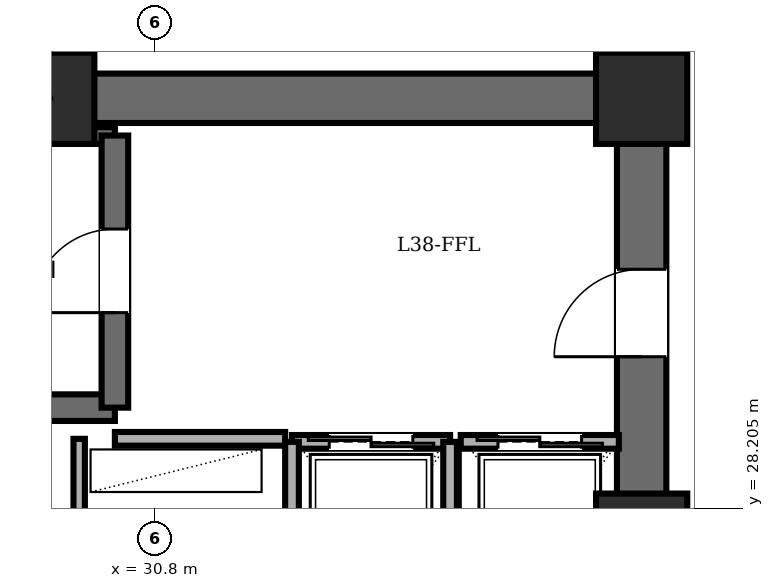
"""IFC4 building model, lengths in metres.
Left out: names, types, materials, properties, quantities, classifications, styles, units other than length and angle.
Written with IfcOpenShell. Run it as: python <this file> out.ifc"""

import sys

from ifc_helpers import new_model, si_unit, direction, frame, frame_2d, origin, origin_2d, place, context, subcontext, project, spatial, rectangle, extrude, element, fill, save


model = new_model("IFC4")
c1 = context("Model", 3, precision=1e-05, world=origin(), true_north=direction((0.0, 1.0)))
c2 = subcontext(c1, "Body", "Model", "MODEL_VIEW")
j1 = project(units=[si_unit("LENGTHUNIT", "METRE"), si_unit("PLANEANGLEUNIT", "RADIAN")], contexts=[c1])
p1 = place(None, origin())
s1 = spatial("IfcSite", under=j1, at=p1, CompositionType="ELEMENT")
p2 = place(p1, origin())
s2 = spatial("IfcBuilding", under=s1, at=p2, CompositionType="ELEMENT")
p3 = place(p2, frame((0.0, 0.0, 147.4)))
s3 = spatial("IfcBuildingStorey", under=s2, at=p3, CompositionType="ELEMENT", Elevation=147.4)
for number, where, z_axis, x_axis in (
    (1, (37.2, 27.8, 0.0), (0.0, 0.0, 1.0), (1.0, 0.0, 0.0)),
    (2, (37.2, 33.6, 0.0), (0.0, 0.0, 1.0), (1.0, 0.0, 0.0)),
    (3, (29.4, 33.6, 0.0), (0.0, 0.0, 1.0), (1.0, 0.0, 0.0)),
):
    element("IfcColumn", number, at=place(p3, frame(where, z_axis=z_axis, x_axis=x_axis)), inside=s3, PredefinedType="COLUMN", context=c2, shape_type="SweptSolid", body=[
        extrude(rectangle(XDim=1.2, YDim=1.2, at=origin_2d()), origin(), (0.0, 0.0, 1.0), 3.6),
    ])
p4 = place(p3, frame((21.6, 33.6, 0.0), z_axis=(0.0, 0.0, 1.0), x_axis=(1.0, 0.0, 0.0)))
e4 = element("IfcWall", 4, at=p4, inside=s3, PredefinedType="SHEAR", context=c2, shape_type="SweptSolid", body=[
    extrude(rectangle(XDim=15.6, YDim=0.65, at=frame_2d((7.8, 0.0))), origin(), (0.0, 0.0, 1.0), 3.4),
])
p5 = place(p3, frame((37.2, 14.4, 0.0), z_axis=(0.0, 0.0, 1.0), x_axis=(0.0, 1.0, 0.0)))
e5 = element("IfcWall", 5, at=p5, inside=s3, PredefinedType="SHEAR", context=c2, shape_type="SweptSolid", body=[
    extrude(rectangle(XDim=19.2, YDim=0.65, at=frame_2d((9.6, 0.0))), origin(), (0.0, 0.0, 1.0), 3.4),
])
p6 = place(p5, frame((15.8, 0.0, 0.0)))
e6 = element("IfcOpeningElement", 6, at=p6, cuts=e5, PredefinedType="OPENING", context=c2, shape_type="SweptSolid", body=[
    extrude(rectangle(XDim=1.15, YDim=2.15, at=frame_2d((0.575, 1.075))), frame((0.0, 0.335, 0.0), z_axis=(0.0, -1.0, 0.0), x_axis=(1.0, 0.0, 0.0)), (0.0, 0.0, 1.0), 0.67),
])
p7 = place(p5, frame((3.6, 0.0, 0.0)))
e7 = element("IfcOpeningElement", 7, at=p7, cuts=e5, PredefinedType="OPENING", context=c2, shape_type="SweptSolid", body=[
    extrude(rectangle(XDim=1.1, YDim=2.15, at=frame_2d((0.55, 1.075))), frame((0.0, 0.335, 0.0), z_axis=(0.0, -1.0, 0.0), x_axis=(1.0, 0.0, 0.0)), (0.0, 0.0, 1.0), 0.67),
])
p8 = place(p5, frame((8.6, 0.0, 0.0)))
e8 = element("IfcOpeningElement", 8, at=p8, cuts=e5, PredefinedType="OPENING", context=c2, shape_type="SweptSolid", body=[
    extrude(rectangle(XDim=1.3, YDim=2.2, at=frame_2d((0.65, 1.1))), frame((0.0, 0.335, 0.0), z_axis=(0.0, -1.0, 0.0), x_axis=(1.0, 0.0, 0.0)), (0.0, 0.0, 1.0), 0.67),
])
p9 = place(p3, frame((22.48, 29.53, 0.0), z_axis=(0.0, 0.0, 1.0), x_axis=(1.0, 0.0, 0.0)))
e9 = element("IfcWall", 9, at=p9, inside=s3, PredefinedType="SOLIDWALL", context=c2, shape_type="SweptSolid", body=[
    extrude(rectangle(XDim=7.79, YDim=0.35, at=frame_2d((3.895, 0.0))), origin(), (0.0, 0.0, 1.0), 3.4),
])
p10 = place(p3, frame((22.48, 33.11, 0.0), z_axis=(0.0, 0.0, 1.0), x_axis=(1.0, 0.0, 0.0)))
e10 = element("IfcWall", 10, at=p10, inside=s3, PredefinedType="PARTITIONING", context=c2, shape_type="SweptSolid", body=[
    extrude(rectangle(XDim=7.79, YDim=0.22, at=frame_2d((3.895, 0.0))), origin(), (0.0, 0.0, 1.0), 3.4),
])
p11 = place(p3, frame((30.27, 29.53, 0.0), z_axis=(0.0, 0.0, 1.0), x_axis=(0.0, 1.0, 0.0)))
e11 = element("IfcWall", 11, at=p11, inside=s3, PredefinedType="SOLIDWALL", context=c2, shape_type="SweptSolid", body=[
    extrude(rectangle(XDim=3.58, YDim=0.35, at=frame_2d((1.79, 0.0))), origin(), (0.0, 0.0, 1.0), 3.4),
])
p12 = place(p11, frame((1.25, 0.0, 0.0)))
e12 = element("IfcOpeningElement", 12, at=p12, cuts=e11, PredefinedType="OPENING", context=c2, shape_type="SweptSolid", body=[
    extrude(rectangle(XDim=1.1, YDim=2.15, at=frame_2d((0.55, 1.075))), frame((0.0, 0.185, 0.0), z_axis=(0.0, -1.0, 0.0), x_axis=(1.0, 0.0, 0.0)), (0.0, 0.0, 1.0), 0.37),
])
p13 = place(p3, frame((30.27, 29.12, 0.0), z_axis=(0.0, 0.0, 1.0), x_axis=(1.0, 0.0, 0.0)))
e13 = element("IfcWall", 13, at=p13, inside=s3, PredefinedType="PARTITIONING", context=c2, shape_type="SweptSolid", body=[
    extrude(rectangle(XDim=2.24, YDim=0.18, at=frame_2d((1.12, 0.0))), origin(), (0.0, 0.0, 1.0), 3.4),
])
p14 = place(p3, frame((29.8, 27.6, 0.0), z_axis=(0.0, 0.0, 1.0), x_axis=(0.0, 1.0, 0.0)))
e14 = element("IfcWall", 14, at=p14, inside=s3, PredefinedType="PARTITIONING", context=c2, shape_type="SweptSolid", body=[
    extrude(rectangle(XDim=1.52, YDim=0.15, at=frame_2d((0.76, 0.0))), origin(), (0.0, 0.0, 1.0), 3.4),
])
p15 = place(p3, frame((32.6, 29.08, 0.0), z_axis=(0.0, 0.0, 1.0), x_axis=(1.0, 0.0, 0.0)))
e15 = element("IfcWall", 15, at=p15, inside=s3, PredefinedType="PARTITIONING", context=c2, shape_type="SweptSolid", body=[
    extrude(rectangle(XDim=2.08, YDim=0.18, at=frame_2d((1.04, 0.0))), origin(), (0.0, 0.0, 1.0), 3.4),
])
p16 = place(p15, frame((0.49, 0.0, 0.0)))
e16 = element("IfcOpeningElement", 16, at=p16, cuts=e15, PredefinedType="OPENING", context=c2, shape_type="SweptSolid", body=[
    extrude(rectangle(XDim=1.1, YDim=2.2, at=frame_2d((0.55, 1.1))), frame((0.0, 0.1, 0.0), z_axis=(0.0, -1.0, 0.0), x_axis=(1.0, 0.0, 0.0)), (0.0, 0.0, 1.0), 0.2),
])
for number, where, z_axis, x_axis in (
    (17, (34.68, 26.35, 0.0), (0.0, 0.0, 1.0), (0.0, 1.0, 0.0)),
    (18, (32.6, 29.08, 0.0), (0.0, 0.0, 1.0), (0.0, -1.0, 0.0)),
):
    element("IfcWall", number, at=place(p3, frame(where, z_axis=z_axis, x_axis=x_axis)), inside=s3, PredefinedType="PARTITIONING", context=c2, shape_type="SweptSolid", body=[
        extrude(rectangle(XDim=2.73, YDim=0.18, at=frame_2d((1.365, 0.0))), origin(), (0.0, 0.0, 1.0), 3.4),
    ])
p17 = place(p3, frame((34.82, 29.08, 0.0), z_axis=(0.0, 0.0, 1.0), x_axis=(1.0, 0.0, 0.0)))
e19 = element("IfcWall", 19, at=p17, inside=s3, PredefinedType="PARTITIONING", context=c2, shape_type="SweptSolid", body=[
    extrude(rectangle(XDim=2.08, YDim=0.18, at=frame_2d((1.04, 0.0))), origin(), (0.0, 0.0, 1.0), 3.4),
])
p18 = place(p17, frame((0.49, 0.0, 0.0)))
e20 = element("IfcOpeningElement", 20, at=p18, cuts=e19, PredefinedType="OPENING", context=c2, shape_type="SweptSolid", body=[
    extrude(rectangle(XDim=1.1, YDim=2.2, at=frame_2d((0.55, 1.1))), frame((0.0, 0.1, 0.0), z_axis=(0.0, -1.0, 0.0), x_axis=(1.0, 0.0, 0.0)), (0.0, 0.0, 1.0), 0.2),
])
p19 = place(p12, origin())
e21 = element("IfcDoor", 21, at=p19, inside=s3, OperationType="SINGLE_SWING_LEFT", PredefinedType="DOOR", context=c2, shape_type="SweptSolid", body=[
    extrude(rectangle(XDim=1.1, YDim=2.15, at=frame_2d((0.55, 1.075))), frame((0.0, 0.025, 0.0), z_axis=(0.0, -1.0, 0.0), x_axis=(1.0, 0.0, 0.0)), (0.0, 0.0, 1.0), 0.05),
])
fill(e12, e21)
p20 = place(p6, origin())
e22 = element("IfcDoor", 22, at=p20, inside=s3, OperationType="SINGLE_SWING_LEFT", PredefinedType="DOOR", context=c2, shape_type="SweptSolid", body=[
    extrude(rectangle(XDim=1.15, YDim=2.15, at=frame_2d((0.575, 1.075))), frame((0.0, 0.025, 0.0), z_axis=(0.0, -1.0, 0.0), x_axis=(1.0, 0.0, 0.0)), (0.0, 0.0, 1.0), 0.05),
])
fill(e6, e22)
p21 = place(p16, origin())
e23 = element("IfcDoor", 23, at=p21, inside=s3, OperationType="DOUBLE_DOOR_SLIDING", PredefinedType="DOOR", context=c2, shape_type="SweptSolid", body=[
    extrude(rectangle(XDim=1.1, YDim=2.2, at=frame_2d((0.55, 1.1))), frame((0.0, 0.025, 0.0), z_axis=(0.0, -1.0, 0.0), x_axis=(1.0, 0.0, 0.0)), (0.0, 0.0, 1.0), 0.05),
])
fill(e16, e23)
p22 = place(p18, origin())
e24 = element("IfcDoor", 24, at=p22, inside=s3, OperationType="DOUBLE_DOOR_SLIDING", PredefinedType="DOOR", context=c2, shape_type="SweptSolid", body=[
    extrude(rectangle(XDim=1.1, YDim=2.2, at=frame_2d((0.55, 1.1))), frame((0.0, 0.025, 0.0), z_axis=(0.0, -1.0, 0.0), x_axis=(1.0, 0.0, 0.0)), (0.0, 0.0, 1.0), 0.05),
])
fill(e20, e24)
save(model, sys.argv[1])
